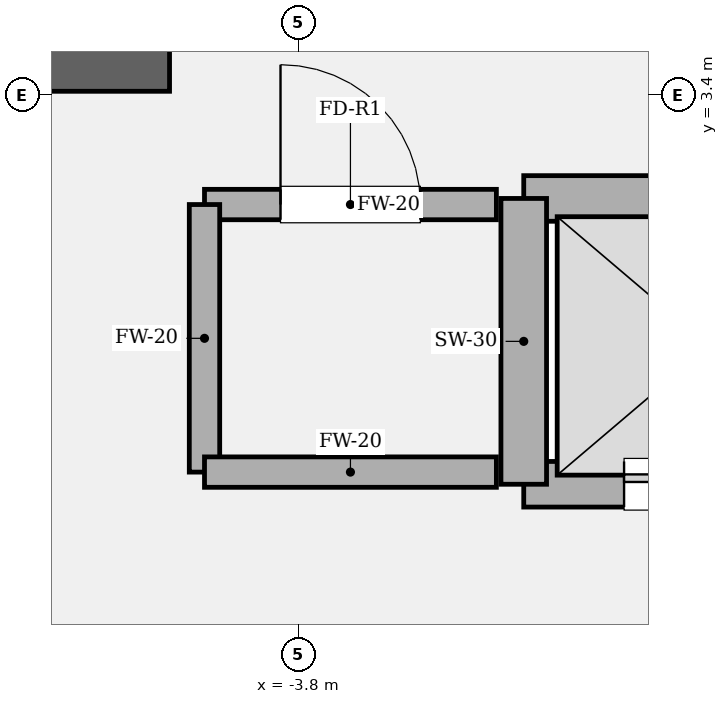
"""IFC4 building model, lengths in metres.
Left out: names, types, materials, properties, quantities, classifications, styles, units other than length and angle.
Written with IfcOpenShell. Run it as: python <this file> out.ifc"""

import sys

from ifc_helpers import new_model, si_unit, direction, frame, frame_2d, origin, place, context, subcontext, project, spatial, rectangle, extrude, element, fill, save


model = new_model("IFC4")
c1 = context("Model", 3, precision=1e-05, world=origin(), true_north=direction((0.0, 1.0)))
c2 = subcontext(c1, "Body", "Model", "MODEL_VIEW")
j1 = project(units=[si_unit("LENGTHUNIT", "METRE"), si_unit("PLANEANGLEUNIT", "RADIAN")], contexts=[c1])
p1 = place(None, origin())
s1 = spatial("IfcSite", under=j1, at=p1, CompositionType="ELEMENT")
p2 = place(p1, origin())
s2 = spatial("IfcBuilding", under=s1, at=p2, CompositionType="ELEMENT")
p3 = place(p2, frame((0.0, 0.0, 304.8)))
s3 = spatial("IfcBuildingStorey", under=s2, at=p3, CompositionType="ELEMENT", Elevation=304.8)
p4 = place(p3, frame((-9.925, 3.6, 0.0), z_axis=(0.0, 0.0, 1.0), x_axis=(1.0, 0.0, 0.0)))
e1 = element("IfcWall", 1, at=p4, inside=s3, PredefinedType="SOLIDWALL", context=c2, shape_type="SweptSolid", body=[
    extrude(rectangle(XDim=5.275, YDim=0.35, at=frame_2d((2.638, 0.0))), origin(), (0.0, 0.0, 1.0), 4.2),
])
p5 = place(p3, frame((-2.32, 0.84, 0.0), z_axis=(0.0, 0.0, 1.0), x_axis=(1.0, 0.0, 0.0)))
e2 = element("IfcWall", 2, at=p5, inside=s3, PredefinedType="SOLIDWALL", context=c2, shape_type="SweptSolid", body=[
    extrude(rectangle(XDim=4.64, YDim=0.3, at=frame_2d((2.32, 0.0))), origin(), (0.0, 0.0, 1.0), 4.0),
])
p6 = place(p5, frame((0.66, 0.0, 0.0)))
e3 = element("IfcOpeningElement", 3, at=p6, cuts=e2, PredefinedType="OPENING", context=c2, shape_type="SweptSolid", body=[
    extrude(rectangle(XDim=1.12, YDim=2.25, at=frame_2d((0.56, 1.125))), frame((0.0, 0.16, 0.0), z_axis=(0.0, -1.0, 0.0), x_axis=(1.0, 0.0, 0.0)), (0.0, 0.0, 1.0), 0.32),
])
p7 = place(p5, frame((2.86, 0.0, 0.0)))
e4 = element("IfcOpeningElement", 4, at=p7, cuts=e2, PredefinedType="OPENING", context=c2, shape_type="SweptSolid", body=[
    extrude(rectangle(XDim=1.12, YDim=2.25, at=frame_2d((0.56, 1.125))), frame((0.0, 0.16, 0.0), z_axis=(0.0, -1.0, 0.0), x_axis=(1.0, 0.0, 0.0)), (0.0, 0.0, 1.0), 0.32),
])
p8 = place(p3, frame((-2.32, 2.72, 0.0), z_axis=(0.0, 0.0, 1.0), x_axis=(1.0, 0.0, 0.0)))
e5 = element("IfcWall", 5, at=p8, inside=s3, PredefinedType="SOLIDWALL", context=c2, shape_type="SweptSolid", body=[
    extrude(rectangle(XDim=4.64, YDim=0.3, at=frame_2d((2.32, 0.0))), origin(), (0.0, 0.0, 1.0), 4.0),
])
p9 = place(p3, frame((-2.32, 0.84, 0.0), z_axis=(0.0, 0.0, 1.0), x_axis=(0.0, 1.0, 0.0)))
e6 = element("IfcWall", 6, at=p9, inside=s3, PredefinedType="SOLIDWALL", context=c2, shape_type="SweptSolid", body=[
    extrude(rectangle(XDim=1.88, YDim=0.3, at=frame_2d((0.94, 0.0))), origin(), (0.0, 0.0, 1.0), 4.0),
])
p10 = place(p3, frame((-2.5, 2.68, 0.0), z_axis=(0.0, 0.0, 1.0), x_axis=(-1.0, 0.0, 0.0)))
e7 = element("IfcWall", 7, at=p10, inside=s3, PredefinedType="SOLIDWALL", context=c2, shape_type="SweptSolid", body=[
    extrude(rectangle(XDim=1.92, YDim=0.2, at=frame_2d((0.96, 0.0))), origin(), (0.0, 0.0, 1.0), 4.0),
])
p11 = place(p10, frame((0.5, 0.0, 0.0)))
e8 = element("IfcOpeningElement", 8, at=p11, cuts=e7, PredefinedType="OPENING", context=c2, shape_type="SweptSolid", body=[
    extrude(rectangle(XDim=0.92, YDim=2.1, at=frame_2d((0.46, 1.05))), frame((0.0, 0.11, 0.0), z_axis=(0.0, -1.0, 0.0), x_axis=(1.0, 0.0, 0.0)), (0.0, 0.0, 1.0), 0.22),
])
p12 = place(p3, frame((-4.42, 2.68, 0.0), z_axis=(0.0, 0.0, 1.0), x_axis=(0.0, -1.0, 0.0)))
e9 = element("IfcWall", 9, at=p12, inside=s3, PredefinedType="SOLIDWALL", context=c2, shape_type="SweptSolid", body=[
    extrude(rectangle(XDim=1.76, YDim=0.2, at=frame_2d((0.88, 0.0))), origin(), (0.0, 0.0, 1.0), 4.0),
])
p13 = place(p3, frame((-4.42, 0.92, 0.0), z_axis=(0.0, 0.0, 1.0), x_axis=(1.0, 0.0, 0.0)))
e10 = element("IfcWall", 10, at=p13, inside=s3, PredefinedType="SOLIDWALL", context=c2, shape_type="SweptSolid", body=[
    extrude(rectangle(XDim=1.92, YDim=0.2, at=frame_2d((0.96, 0.0))), origin(), (0.0, 0.0, 1.0), 4.0),
])
p14 = place(p6, origin())
e11 = element("IfcDoor", 11, at=p14, inside=s3, OperationType="DOUBLE_DOOR_SLIDING", PredefinedType="DOOR", context=c2, shape_type="SweptSolid", body=[
    extrude(rectangle(XDim=1.12, YDim=2.25, at=frame_2d((0.56, 1.125))), frame((0.0, 0.025, 0.0), z_axis=(0.0, -1.0, 0.0), x_axis=(1.0, 0.0, 0.0)), (0.0, 0.0, 1.0), 0.05),
])
fill(e3, e11)
p15 = place(p11, origin())
e12 = element("IfcDoor", 12, at=p15, inside=s3, OperationType="SINGLE_SWING_RIGHT", PredefinedType="DOOR", context=c2, shape_type="SweptSolid", body=[
    extrude(rectangle(XDim=0.92, YDim=2.1, at=frame_2d((0.46, 1.05))), frame((0.0, 0.025, 0.0), z_axis=(0.0, -1.0, 0.0), x_axis=(1.0, 0.0, 0.0)), (0.0, 0.0, 1.0), 0.05),
])
fill(e8, e12)
save(model, sys.argv[1])
